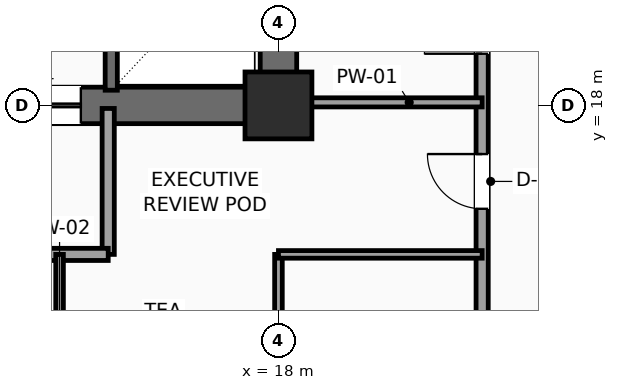
"""IFC4 building model, lengths in metres.
Left out: names, types, materials, properties, quantities, classifications, styles, units other than length and angle.
Written with IfcOpenShell. Run it as: python <this file> out.ifc"""

import sys

from ifc_helpers import new_model, si_unit, direction, frame, frame_2d, origin, origin_2d, place, context, subcontext, project, spatial, rectangle, extrude, element, fill, save


model = new_model("IFC4")
c1 = context("Model", 3, precision=1e-05, world=origin(), true_north=direction((0.0, 1.0)))
c2 = subcontext(c1, "Body", "Model", "MODEL_VIEW")
j1 = project(units=[si_unit("LENGTHUNIT", "METRE"), si_unit("PLANEANGLEUNIT", "RADIAN")], contexts=[c1])
p1 = place(None, origin())
s1 = spatial("IfcSite", under=j1, at=p1, CompositionType="ELEMENT")
p2 = place(p1, origin())
s2 = spatial("IfcBuilding", under=s1, at=p2, CompositionType="ELEMENT")
p3 = place(p2, frame((0.0, 0.0, 153.15)))
s3 = spatial("IfcBuildingStorey", under=s2, at=p3, CompositionType="ELEMENT", Elevation=153.15)
p4 = place(p3, frame((18.0, 18.0, 0.0), z_axis=(0.0, 0.0, 1.0), x_axis=(1.0, 0.0, 0.0)))
e1 = element("IfcColumn", 1, at=p4, inside=s3, PredefinedType="COLUMN", context=c2, shape_type="SweptSolid", body=[
    extrude(rectangle(XDim=1.1, YDim=1.1, at=origin_2d()), origin(), (0.0, 0.0, 1.0), 3.75),
])
p5 = place(p3, frame((6.0, 18.0, 0.0), z_axis=(0.0, 0.0, 1.0), x_axis=(1.0, 0.0, 0.0)))
e2 = element("IfcWall", 2, at=p5, inside=s3, PredefinedType="SHEAR", context=c2, shape_type="SweptSolid", body=[
    extrude(rectangle(XDim=12.0, YDim=0.6, at=frame_2d((6.0, 0.0))), origin(), (0.0, 0.0, 1.0), 3.525),
])
p6 = place(p5, frame((7.15, 0.0, 0.0)))
e3 = element("IfcOpeningElement", 3, at=p6, cuts=e2, PredefinedType="OPENING", context=c2, shape_type="SweptSolid", body=[
    extrude(rectangle(XDim=1.6, YDim=2.3, at=frame_2d((0.8, 1.15))), frame((0.0, 0.31, 0.0), z_axis=(0.0, -1.0, 0.0), x_axis=(1.0, 0.0, 0.0)), (0.0, 0.0, 1.0), 0.62),
])
p7 = place(p3, frame((18.0, 18.0, 0.0), z_axis=(0.0, 0.0, 1.0), x_axis=(0.0, 1.0, 0.0)))
e4 = element("IfcWall", 4, at=p7, inside=s3, PredefinedType="SHEAR", context=c2, shape_type="SweptSolid", body=[
    extrude(rectangle(XDim=9.6, YDim=0.6, at=frame_2d((4.8, 0.0))), origin(), (0.0, 0.0, 1.0), 3.525),
])
p8 = place(p3, frame((15.25, 18.25, 0.0), z_axis=(0.0, 0.0, 1.0), x_axis=(0.0, 1.0, 0.0)))
e5 = element("IfcWall", 5, at=p8, inside=s3, PredefinedType="SHEAR", context=c2, shape_type="SweptSolid", body=[
    extrude(rectangle(XDim=5.2, YDim=0.2, at=frame_2d((2.6, 0.0))), origin(), (0.0, 0.0, 1.0), 3.525),
])
p9 = place(p3, frame((15.2, 17.95, 0.0), z_axis=(0.0, 0.0, 1.0), x_axis=(0.0, -1.0, 0.0)))
e6 = element("IfcWall", 6, at=p9, inside=s3, PredefinedType="SOLIDWALL", context=c2, shape_type="SweptSolid", body=[
    extrude(rectangle(XDim=2.4, YDim=0.2, at=frame_2d((1.2, 0.0))), origin(), (0.0, 0.0, 1.0), 3.525),
])
p10 = place(p3, frame((15.2, 15.55, 0.0), z_axis=(0.0, 0.0, 1.0), x_axis=(-1.0, 0.0, 0.0)))
e7 = element("IfcWall", 7, at=p10, inside=s3, PredefinedType="SOLIDWALL", context=c2, shape_type="SweptSolid", body=[
    extrude(rectangle(XDim=4.4, YDim=0.2, at=frame_2d((2.2, 0.0))), origin(), (0.0, 0.0, 1.0), 3.525),
])
p11 = place(p3, frame((21.35, 11.65, 0.0), z_axis=(0.0, 0.0, 1.0), x_axis=(0.0, 1.0, 0.0)))
e8 = element("IfcWall", 8, at=p11, inside=s3, PredefinedType="SOLIDWALL", context=c2, shape_type="SweptSolid", body=[
    extrude(rectangle(XDim=18.6, YDim=0.2, at=frame_2d((9.3, 0.0))), origin(), (0.0, 0.0, 1.0), 3.525),
])
p12 = place(p11, frame((7.2, 0.0, 0.0)))
e9 = element("IfcOpeningElement", 9, at=p12, cuts=e8, PredefinedType="OPENING", context=c2, shape_type="SweptSolid", body=[
    extrude(rectangle(XDim=0.95, YDim=2.15, at=frame_2d((0.475, 1.075))), frame((0.0, 0.11, 0.0), z_axis=(0.0, -1.0, 0.0), x_axis=(1.0, 0.0, 0.0)), (0.0, 0.0, 1.0), 0.22),
])
p13 = place(p11, frame((10.45, 0.0, 0.0)))
e10 = element("IfcOpeningElement", 10, at=p13, cuts=e8, PredefinedType="OPENING", context=c2, shape_type="SweptSolid", body=[
    extrude(rectangle(XDim=0.9, YDim=2.1, at=frame_2d((0.45, 1.05))), frame((0.0, 0.11, 0.0), z_axis=(0.0, -1.0, 0.0), x_axis=(1.0, 0.0, 0.0)), (0.0, 0.0, 1.0), 0.22),
])
p14 = place(p11, frame((13.9, 0.0, 0.0)))
e11 = element("IfcOpeningElement", 11, at=p14, cuts=e8, PredefinedType="OPENING", context=c2, shape_type="SweptSolid", body=[
    extrude(rectangle(XDim=0.95, YDim=2.15, at=frame_2d((0.475, 1.075))), frame((0.0, 0.11, 0.0), z_axis=(0.0, -1.0, 0.0), x_axis=(1.0, 0.0, 0.0)), (0.0, 0.0, 1.0), 0.22),
])
p15 = place(p11, frame((4.65, 0.0, 0.0)))
e12 = element("IfcOpeningElement", 12, at=p15, cuts=e8, PredefinedType="OPENING", context=c2, shape_type="SweptSolid", body=[
    extrude(rectangle(XDim=0.9, YDim=2.1, at=frame_2d((0.45, 1.05))), frame((0.0, 0.11, 0.0), z_axis=(0.0, -1.0, 0.0), x_axis=(1.0, 0.0, 0.0)), (0.0, 0.0, 1.0), 0.22),
])
p16 = place(p3, frame((14.4, 11.65, 0.0), z_axis=(0.0, 0.0, 1.0), x_axis=(0.0, 1.0, 0.0)))
e13 = element("IfcWall", 13, at=p16, inside=s3, PredefinedType="PARTITIONING", context=c2, shape_type="SweptSolid", body=[
    extrude(rectangle(XDim=3.9, YDim=0.125, at=frame_2d((1.95, 0.0))), origin(), (0.0, 0.0, 1.0), 3.525),
])
p17 = place(p3, frame((18.0, 11.65, 0.0), z_axis=(0.0, 0.0, 1.0), x_axis=(0.0, 1.0, 0.0)))
e14 = element("IfcWall", 14, at=p17, inside=s3, PredefinedType="PARTITIONING", context=c2, shape_type="SweptSolid", body=[
    extrude(rectangle(XDim=3.9, YDim=0.125, at=frame_2d((1.95, 0.0))), origin(), (0.0, 0.0, 1.0), 3.017),
])
p18 = place(p3, frame((18.0, 15.55, 0.0), z_axis=(0.0, 0.0, 1.0), x_axis=(1.0, 0.0, 0.0)))
e15 = element("IfcWall", 15, at=p18, inside=s3, PredefinedType="PARTITIONING", context=c2, shape_type="SweptSolid", body=[
    extrude(rectangle(XDim=3.35, YDim=0.125, at=frame_2d((1.675, 0.0))), origin(), (0.0, 0.0, 1.0), 3.525),
])
p19 = place(p3, frame((18.1, 18.05, 0.0), z_axis=(0.0, 0.0, 1.0), x_axis=(1.0, 0.0, 0.0)))
e16 = element("IfcWall", 16, at=p19, inside=s3, PredefinedType="PARTITIONING", context=c2, shape_type="SweptSolid", body=[
    extrude(rectangle(XDim=3.25, YDim=0.15, at=frame_2d((1.625, 0.0))), origin(), (0.0, 0.0, 1.0), 3.017),
])
p20 = place(p6, origin())
e17 = element("IfcDoor", 17, at=p20, inside=s3, OperationType="DOUBLE_DOOR_SLIDING", PredefinedType="DOOR", context=c2, shape_type="SweptSolid", body=[
    extrude(rectangle(XDim=1.6, YDim=2.3, at=frame_2d((0.8, 1.15))), frame((0.0, 0.025, 0.0), z_axis=(0.0, -1.0, 0.0), x_axis=(1.0, 0.0, 0.0)), (0.0, 0.0, 1.0), 0.05),
])
fill(e3, e17)
p21 = place(p12, origin())
e18 = element("IfcDoor", 18, at=p21, inside=s3, OperationType="SINGLE_SWING_LEFT", PredefinedType="DOOR", context=c2, shape_type="SweptSolid", body=[
    extrude(rectangle(XDim=0.95, YDim=2.15, at=frame_2d((0.475, 1.075))), frame((0.0, 0.025, 0.0), z_axis=(0.0, -1.0, 0.0), x_axis=(1.0, 0.0, 0.0)), (0.0, 0.0, 1.0), 0.05),
])
fill(e9, e18)
p22 = place(p15, origin())
e19 = element("IfcDoor", 19, at=p22, inside=s3, OperationType="SINGLE_SWING_RIGHT", PredefinedType="DOOR", context=c2, shape_type="SweptSolid", body=[
    extrude(rectangle(XDim=0.9, YDim=2.1, at=frame_2d((0.45, 1.05))), frame((0.0, 0.025, 0.0), z_axis=(0.0, -1.0, 0.0), x_axis=(1.0, 0.0, 0.0)), (0.0, 0.0, 1.0), 0.05),
])
fill(e12, e19)
save(model, sys.argv[1])
